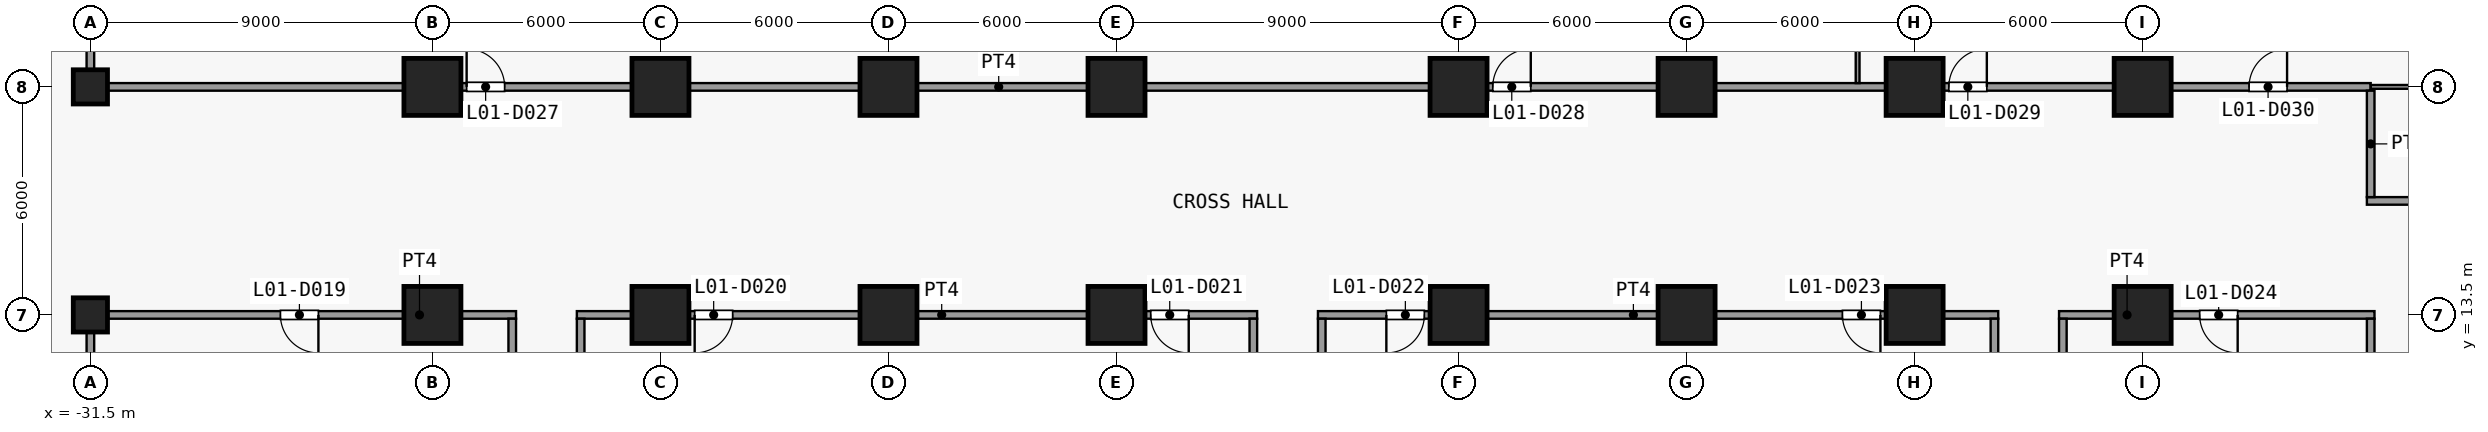
"""IFC4 building model, lengths in metres.
Left out: names, types, materials, properties, quantities, classifications, styles, units other than length and angle.
Written with IfcOpenShell. Run it as: python <this file> out.ifc"""

import sys

from ifc_helpers import new_model, si_unit, direction, frame, frame_2d, origin, origin_2d, place, context, subcontext, project, spatial, rectangle, extrude, element, fill, save


model = new_model("IFC4")
c1 = context("Model", 3, precision=1e-05, world=origin(), true_north=direction((0.0, 1.0)))
c2 = subcontext(c1, "Body", "Model", "MODEL_VIEW")
j1 = project(units=[si_unit("LENGTHUNIT", "METRE"), si_unit("PLANEANGLEUNIT", "RADIAN")], contexts=[c1])
p1 = place(None, origin())
s1 = spatial("IfcSite", under=j1, at=p1, CompositionType="ELEMENT")
p2 = place(p1, origin())
s2 = spatial("IfcBuilding", under=s1, at=p2, CompositionType="ELEMENT")
p3 = place(p2, frame((0.0, 0.0, 8.0)))
s3 = spatial("IfcBuildingStorey", under=s2, at=p3, CompositionType="ELEMENT", Elevation=8.0)
for number, where, z_axis, x_axis in (
    (1, (-31.5, 13.5, 0.0), (0.0, 0.0, 1.0), (1.0, 0.0, 0.0)),
    (2, (-31.5, 19.5, 0.0), (0.0, 0.0, 1.0), (1.0, 0.0, 0.0)),
):
    element("IfcColumn", number, at=place(p3, frame(where, z_axis=z_axis, x_axis=x_axis)), inside=s3, PredefinedType="COLUMN", context=c2, shape_type="SweptSolid", body=[
        extrude(rectangle(XDim=0.9, YDim=0.9, at=origin_2d()), origin(), (0.0, 0.0, 1.0), 5.5),
    ])
for number, where, z_axis, x_axis in (
    (3, (-22.5, 13.5, 0.0), (0.0, 0.0, 1.0), (1.0, 0.0, 0.0)),
    (4, (-22.5, 19.5, 0.0), (0.0, 0.0, 1.0), (1.0, 0.0, 0.0)),
    (5, (-16.5, 13.5, 0.0), (0.0, 0.0, 1.0), (1.0, 0.0, 0.0)),
    (6, (-16.5, 19.5, 0.0), (0.0, 0.0, 1.0), (1.0, 0.0, 0.0)),
    (7, (-10.5, 13.5, 0.0), (0.0, 0.0, 1.0), (1.0, 0.0, 0.0)),
    (8, (-10.5, 19.5, 0.0), (0.0, 0.0, 1.0), (1.0, 0.0, 0.0)),
    (9, (-4.5, 13.5, 0.0), (0.0, 0.0, 1.0), (1.0, 0.0, 0.0)),
    (10, (-4.5, 19.5, 0.0), (0.0, 0.0, 1.0), (1.0, 0.0, 0.0)),
    (11, (4.5, 13.5, 0.0), (0.0, 0.0, 1.0), (1.0, 0.0, 0.0)),
    (12, (4.5, 19.5, 0.0), (0.0, 0.0, 1.0), (1.0, 0.0, 0.0)),
    (13, (10.5, 13.5, 0.0), (0.0, 0.0, 1.0), (1.0, 0.0, 0.0)),
    (14, (10.5, 19.5, 0.0), (0.0, 0.0, 1.0), (1.0, 0.0, 0.0)),
    (15, (16.5, 13.5, 0.0), (0.0, 0.0, 1.0), (1.0, 0.0, 0.0)),
    (16, (16.5, 19.5, 0.0), (0.0, 0.0, 1.0), (1.0, 0.0, 0.0)),
    (17, (22.5, 13.5, 0.0), (0.0, 0.0, 1.0), (1.0, 0.0, 0.0)),
    (18, (22.5, 19.5, 0.0), (0.0, 0.0, 1.0), (1.0, 0.0, 0.0)),
):
    element("IfcColumn", number, at=place(p3, frame(where, z_axis=z_axis, x_axis=x_axis)), inside=s3, PredefinedType="COLUMN", context=c2, shape_type="SweptSolid", body=[
        extrude(rectangle(XDim=1.5, YDim=1.5, at=origin_2d()), origin(), (0.0, 0.0, 1.0), 5.5),
    ])
p4 = place(p3, frame((-31.6, 13.5, 0.0), z_axis=(0.0, 0.0, 1.0), x_axis=(1.0, 0.0, 0.0)))
e19 = element("IfcWall", 19, at=p4, inside=s3, PredefinedType="PARTITIONING", context=c2, shape_type="SweptSolid", body=[
    extrude(rectangle(XDim=11.3, YDim=0.2, at=frame_2d((5.65, 0.0))), origin(), (0.0, 0.0, 1.0), 5.15),
])
p5 = place(p4, frame((5.1, 0.0, 0.0)))
e20 = element("IfcOpeningElement", 20, at=p5, cuts=e19, PredefinedType="OPENING", context=c2, shape_type="SweptSolid", body=[
    extrude(rectangle(XDim=1.0, YDim=2.1, at=frame_2d((0.5, 1.05))), frame((0.0, 0.11, 0.0), z_axis=(0.0, -1.0, 0.0), x_axis=(1.0, 0.0, 0.0)), (0.0, 0.0, 1.0), 0.22),
])
p6 = place(p3, frame((-18.7, 13.5, 0.0), z_axis=(0.0, 0.0, 1.0), x_axis=(1.0, 0.0, 0.0)))
e21 = element("IfcWall", 21, at=p6, inside=s3, PredefinedType="PARTITIONING", context=c2, shape_type="SweptSolid", body=[
    extrude(rectangle(XDim=17.9, YDim=0.2, at=frame_2d((8.95, 0.0))), origin(), (0.0, 0.0, 1.0), 5.15),
])
p7 = place(p6, frame((3.1, 0.0, 0.0)))
e22 = element("IfcOpeningElement", 22, at=p7, cuts=e21, PredefinedType="OPENING", context=c2, shape_type="SweptSolid", body=[
    extrude(rectangle(XDim=1.0, YDim=2.1, at=frame_2d((0.5, 1.05))), frame((0.0, 0.11, 0.0), z_axis=(0.0, -1.0, 0.0), x_axis=(1.0, 0.0, 0.0)), (0.0, 0.0, 1.0), 0.22),
])
p8 = place(p6, frame((15.1, 0.0, 0.0)))
e23 = element("IfcOpeningElement", 23, at=p8, cuts=e21, PredefinedType="OPENING", context=c2, shape_type="SweptSolid", body=[
    extrude(rectangle(XDim=1.0, YDim=2.1, at=frame_2d((0.5, 1.05))), frame((0.0, 0.11, 0.0), z_axis=(0.0, -1.0, 0.0), x_axis=(1.0, 0.0, 0.0)), (0.0, 0.0, 1.0), 0.22),
])
p9 = place(p3, frame((0.8, 13.5, 0.0), z_axis=(0.0, 0.0, 1.0), x_axis=(1.0, 0.0, 0.0)))
e24 = element("IfcWall", 24, at=p9, inside=s3, PredefinedType="PARTITIONING", context=c2, shape_type="SweptSolid", body=[
    extrude(rectangle(XDim=17.9, YDim=0.2, at=frame_2d((8.95, 0.0))), origin(), (0.0, 0.0, 1.0), 5.15),
])
p10 = place(p9, frame((1.8, 0.0, 0.0)))
e25 = element("IfcOpeningElement", 25, at=p10, cuts=e24, PredefinedType="OPENING", context=c2, shape_type="SweptSolid", body=[
    extrude(rectangle(XDim=1.0, YDim=2.1, at=frame_2d((0.5, 1.05))), frame((0.0, 0.11, 0.0), z_axis=(0.0, -1.0, 0.0), x_axis=(1.0, 0.0, 0.0)), (0.0, 0.0, 1.0), 0.22),
])
p11 = place(p9, frame((13.8, 0.0, 0.0)))
e26 = element("IfcOpeningElement", 26, at=p11, cuts=e24, PredefinedType="OPENING", context=c2, shape_type="SweptSolid", body=[
    extrude(rectangle(XDim=1.0, YDim=2.1, at=frame_2d((0.5, 1.05))), frame((0.0, 0.11, 0.0), z_axis=(0.0, -1.0, 0.0), x_axis=(1.0, 0.0, 0.0)), (0.0, 0.0, 1.0), 0.22),
])
p12 = place(p3, frame((20.3, 13.5, 0.0), z_axis=(0.0, 0.0, 1.0), x_axis=(1.0, 0.0, 0.0)))
e27 = element("IfcWall", 27, at=p12, inside=s3, PredefinedType="PARTITIONING", context=c2, shape_type="SweptSolid", body=[
    extrude(rectangle(XDim=8.3, YDim=0.2, at=frame_2d((4.15, 0.0))), origin(), (0.0, 0.0, 1.0), 5.15),
])
p13 = place(p12, frame((3.7, 0.0, 0.0)))
e28 = element("IfcOpeningElement", 28, at=p13, cuts=e27, PredefinedType="OPENING", context=c2, shape_type="SweptSolid", body=[
    extrude(rectangle(XDim=1.0, YDim=2.1, at=frame_2d((0.5, 1.05))), frame((0.0, 0.11, 0.0), z_axis=(0.0, -1.0, 0.0), x_axis=(1.0, 0.0, 0.0)), (0.0, 0.0, 1.0), 0.22),
])
p14 = place(p3, frame((28.4, 16.5, 0.0), z_axis=(0.0, 0.0, 1.0), x_axis=(1.0, 0.0, 0.0)))
e29 = element("IfcWall", 29, at=p14, inside=s3, PredefinedType="PARTITIONING", context=c2, shape_type="SweptSolid", body=[
    extrude(rectangle(XDim=24.2, YDim=0.2, at=frame_2d((12.1, 0.0))), origin(), (0.0, 0.0, 1.0), 5.15),
])
p15 = place(p14, frame((6.2, 0.0, 0.0)))
e30 = element("IfcOpeningElement", 30, at=p15, cuts=e29, PredefinedType="OPENING", context=c2, shape_type="SweptSolid", body=[
    extrude(rectangle(XDim=1.0, YDim=2.1, at=frame_2d((0.5, 1.05))), frame((0.0, 0.11, 0.0), z_axis=(0.0, -1.0, 0.0), x_axis=(1.0, 0.0, 0.0)), (0.0, 0.0, 1.0), 0.22),
])
p16 = place(p14, frame((17.0, 0.0, 0.0)))
e31 = element("IfcOpeningElement", 31, at=p16, cuts=e29, PredefinedType="OPENING", context=c2, shape_type="SweptSolid", body=[
    extrude(rectangle(XDim=1.0, YDim=2.1, at=frame_2d((0.5, 1.05))), frame((0.0, 0.11, 0.0), z_axis=(0.0, -1.0, 0.0), x_axis=(1.0, 0.0, 0.0)), (0.0, 0.0, 1.0), 0.22),
])
p17 = place(p3, frame((-31.6, 19.5, 0.0), z_axis=(0.0, 0.0, 1.0), x_axis=(1.0, 0.0, 0.0)))
e32 = element("IfcWall", 32, at=p17, inside=s3, PredefinedType="PARTITIONING", context=c2, shape_type="SweptSolid", body=[
    extrude(rectangle(XDim=60.1, YDim=0.2, at=frame_2d((30.05, 0.0))), origin(), (0.0, 0.0, 1.0), 5.15),
])
p18 = place(p17, frame((10.0, 0.0, 0.0)))
e33 = element("IfcOpeningElement", 33, at=p18, cuts=e32, PredefinedType="OPENING", context=c2, shape_type="SweptSolid", body=[
    extrude(rectangle(XDim=1.0, YDim=2.1, at=frame_2d((0.5, 1.05))), frame((0.0, 0.11, 0.0), z_axis=(0.0, -1.0, 0.0), x_axis=(1.0, 0.0, 0.0)), (0.0, 0.0, 1.0), 0.22),
])
p19 = place(p17, frame((37.0, 0.0, 0.0)))
e34 = element("IfcOpeningElement", 34, at=p19, cuts=e32, PredefinedType="OPENING", context=c2, shape_type="SweptSolid", body=[
    extrude(rectangle(XDim=1.0, YDim=2.1, at=frame_2d((0.5, 1.05))), frame((0.0, 0.11, 0.0), z_axis=(0.0, -1.0, 0.0), x_axis=(1.0, 0.0, 0.0)), (0.0, 0.0, 1.0), 0.22),
])
p20 = place(p17, frame((49.0, 0.0, 0.0)))
e35 = element("IfcOpeningElement", 35, at=p20, cuts=e32, PredefinedType="OPENING", context=c2, shape_type="SweptSolid", body=[
    extrude(rectangle(XDim=1.0, YDim=2.1, at=frame_2d((0.5, 1.05))), frame((0.0, 0.11, 0.0), z_axis=(0.0, -1.0, 0.0), x_axis=(1.0, 0.0, 0.0)), (0.0, 0.0, 1.0), 0.22),
])
p21 = place(p17, frame((56.9, 0.0, 0.0)))
e36 = element("IfcOpeningElement", 36, at=p21, cuts=e32, PredefinedType="OPENING", context=c2, shape_type="SweptSolid", body=[
    extrude(rectangle(XDim=1.0, YDim=2.1, at=frame_2d((0.5, 1.05))), frame((0.0, 0.11, 0.0), z_axis=(0.0, -1.0, 0.0), x_axis=(1.0, 0.0, 0.0)), (0.0, 0.0, 1.0), 0.22),
])
p22 = place(p3, frame((28.5, 19.5, 0.0), z_axis=(0.0, 0.0, 1.0), x_axis=(1.0, 0.0, 0.0)))
e37 = element("IfcWall", 37, at=p22, inside=s3, PredefinedType="PARTITIONING", context=c2, shape_type="SweptSolid", body=[
    extrude(rectangle(XDim=23.9, YDim=0.1, at=frame_2d((11.95, 0.0))), origin(), (0.0, 0.0, 1.0), 5.15),
])
p23 = place(p3, frame((-31.5, 1.6, 0.0), z_axis=(0.0, 0.0, 1.0), x_axis=(0.0, 1.0, 0.0)))
e38 = element("IfcWall", 38, at=p23, inside=s3, PredefinedType="PARTITIONING", context=c2, shape_type="SweptSolid", body=[
    extrude(rectangle(XDim=11.8, YDim=0.2, at=frame_2d((5.9, 0.0))), origin(), (0.0, 0.0, 1.0), 5.15),
])
p24 = place(p3, frame((-31.5, 19.6, 0.0), z_axis=(0.0, 0.0, 1.0), x_axis=(0.0, 1.0, 0.0)))
e39 = element("IfcWall", 39, at=p24, inside=s3, PredefinedType="PARTITIONING", context=c2, shape_type="SweptSolid", body=[
    extrude(rectangle(XDim=11.8, YDim=0.2, at=frame_2d((5.9, 0.0))), origin(), (0.0, 0.0, 1.0), 5.15),
])
p25 = place(p24, frame((8.3, 0.0, 0.0)))
e40 = element("IfcOpeningElement", 40, at=p25, cuts=e39, PredefinedType="OPENING", context=c2, shape_type="SweptSolid", body=[
    extrude(rectangle(XDim=1.0, YDim=2.1, at=frame_2d((0.5, 1.05))), frame((0.0, 0.11, 0.0), z_axis=(0.0, -1.0, 0.0), x_axis=(1.0, 0.0, 0.0)), (0.0, 0.0, 1.0), 0.22),
])
for number, where, z_axis, x_axis in (
    (41, (-20.4, 1.6, 0.0), (0.0, 0.0, 1.0), (0.0, 1.0, 0.0)),
    (42, (-18.6, 1.6, 0.0), (0.0, 0.0, 1.0), (0.0, 1.0, 0.0)),
    (43, (-0.9, 1.6, 0.0), (0.0, 0.0, 1.0), (0.0, 1.0, 0.0)),
    (44, (0.9, 1.6, 0.0), (0.0, 0.0, 1.0), (0.0, 1.0, 0.0)),
):
    element("IfcWall", number, at=place(p3, frame(where, z_axis=z_axis, x_axis=x_axis)), inside=s3, PredefinedType="PARTITIONING", context=c2, shape_type="SweptSolid", body=[
        extrude(rectangle(XDim=11.8, YDim=0.2, at=frame_2d((5.9, 0.0))), origin(), (0.0, 0.0, 1.0), 5.15),
    ])
p26 = place(p3, frame((15.0, 19.6, 0.0), z_axis=(0.0, 0.0, 1.0), x_axis=(0.0, 1.0, 0.0)))
e45 = element("IfcWall", 45, at=p26, inside=s3, PredefinedType="PARTITIONING", context=c2, shape_type="SweptSolid", body=[
    extrude(rectangle(XDim=5.85, YDim=0.1, at=frame_2d((2.925, 0.0))), origin(), (0.0, 0.0, 1.0), 5.15),
])
for number, where, z_axis, x_axis in (
    (46, (18.6, 1.6, 0.0), (0.0, 0.0, 1.0), (0.0, 1.0, 0.0)),
    (47, (20.4, 1.6, 0.0), (0.0, 0.0, 1.0), (0.0, 1.0, 0.0)),
    (48, (28.5, 1.6, 0.0), (0.0, 0.0, 1.0), (0.0, 1.0, 0.0)),
):
    element("IfcWall", number, at=place(p3, frame(where, z_axis=z_axis, x_axis=x_axis)), inside=s3, PredefinedType="PARTITIONING", context=c2, shape_type="SweptSolid", body=[
        extrude(rectangle(XDim=11.8, YDim=0.2, at=frame_2d((5.9, 0.0))), origin(), (0.0, 0.0, 1.0), 5.15),
    ])
p27 = place(p3, frame((28.5, 16.6, 0.0), z_axis=(0.0, 0.0, 1.0), x_axis=(0.0, 1.0, 0.0)))
e49 = element("IfcWall", 49, at=p27, inside=s3, PredefinedType="PARTITIONING", context=c2, shape_type="SweptSolid", body=[
    extrude(rectangle(XDim=2.8, YDim=0.2, at=frame_2d((1.4, 0.0))), origin(), (0.0, 0.0, 1.0), 5.15),
])
p28 = place(p5, origin())
e50 = element("IfcDoor", 50, at=p28, inside=s3, OperationType="SINGLE_SWING_RIGHT", PredefinedType="DOOR", context=c2, shape_type="SweptSolid", body=[
    extrude(rectangle(XDim=1.0, YDim=2.1, at=frame_2d((0.5, 1.05))), frame((0.0, 0.025, 0.0), z_axis=(0.0, -1.0, 0.0), x_axis=(1.0, 0.0, 0.0)), (0.0, 0.0, 1.0), 0.05),
])
fill(e20, e50)
p29 = place(p7, origin())
e51 = element("IfcDoor", 51, at=p29, inside=s3, OperationType="SINGLE_SWING_LEFT", PredefinedType="DOOR", context=c2, shape_type="SweptSolid", body=[
    extrude(rectangle(XDim=1.0, YDim=2.1, at=frame_2d((0.5, 1.05))), frame((0.0, 0.025, 0.0), z_axis=(0.0, -1.0, 0.0), x_axis=(1.0, 0.0, 0.0)), (0.0, 0.0, 1.0), 0.05),
])
fill(e22, e51)
p30 = place(p8, origin())
e52 = element("IfcDoor", 52, at=p30, inside=s3, OperationType="SINGLE_SWING_RIGHT", PredefinedType="DOOR", context=c2, shape_type="SweptSolid", body=[
    extrude(rectangle(XDim=1.0, YDim=2.1, at=frame_2d((0.5, 1.05))), frame((0.0, 0.025, 0.0), z_axis=(0.0, -1.0, 0.0), x_axis=(1.0, 0.0, 0.0)), (0.0, 0.0, 1.0), 0.05),
])
fill(e23, e52)
p31 = place(p10, origin())
e53 = element("IfcDoor", 53, at=p31, inside=s3, OperationType="SINGLE_SWING_LEFT", PredefinedType="DOOR", context=c2, shape_type="SweptSolid", body=[
    extrude(rectangle(XDim=1.0, YDim=2.1, at=frame_2d((0.5, 1.05))), frame((0.0, 0.025, 0.0), z_axis=(0.0, -1.0, 0.0), x_axis=(1.0, 0.0, 0.0)), (0.0, 0.0, 1.0), 0.05),
])
fill(e25, e53)
p32 = place(p11, origin())
e54 = element("IfcDoor", 54, at=p32, inside=s3, OperationType="SINGLE_SWING_RIGHT", PredefinedType="DOOR", context=c2, shape_type="SweptSolid", body=[
    extrude(rectangle(XDim=1.0, YDim=2.1, at=frame_2d((0.5, 1.05))), frame((0.0, 0.025, 0.0), z_axis=(0.0, -1.0, 0.0), x_axis=(1.0, 0.0, 0.0)), (0.0, 0.0, 1.0), 0.05),
])
fill(e26, e54)
p33 = place(p13, origin())
e55 = element("IfcDoor", 55, at=p33, inside=s3, OperationType="SINGLE_SWING_RIGHT", PredefinedType="DOOR", context=c2, shape_type="SweptSolid", body=[
    extrude(rectangle(XDim=1.0, YDim=2.1, at=frame_2d((0.5, 1.05))), frame((0.0, 0.025, 0.0), z_axis=(0.0, -1.0, 0.0), x_axis=(1.0, 0.0, 0.0)), (0.0, 0.0, 1.0), 0.05),
])
fill(e28, e55)
p34 = place(p18, origin())
e56 = element("IfcDoor", 56, at=p34, inside=s3, OperationType="SINGLE_SWING_RIGHT", PredefinedType="DOOR", context=c2, shape_type="SweptSolid", body=[
    extrude(rectangle(XDim=1.0, YDim=2.1, at=frame_2d((0.5, 1.05))), frame((0.0, 0.025, 0.0), z_axis=(0.0, -1.0, 0.0), x_axis=(1.0, 0.0, 0.0)), (0.0, 0.0, 1.0), 0.05),
])
fill(e33, e56)
p35 = place(p19, origin())
e57 = element("IfcDoor", 57, at=p35, inside=s3, OperationType="SINGLE_SWING_LEFT", PredefinedType="DOOR", context=c2, shape_type="SweptSolid", body=[
    extrude(rectangle(XDim=1.0, YDim=2.1, at=frame_2d((0.5, 1.05))), frame((0.0, 0.025, 0.0), z_axis=(0.0, -1.0, 0.0), x_axis=(1.0, 0.0, 0.0)), (0.0, 0.0, 1.0), 0.05),
])
fill(e34, e57)
p36 = place(p20, origin())
e58 = element("IfcDoor", 58, at=p36, inside=s3, OperationType="SINGLE_SWING_LEFT", PredefinedType="DOOR", context=c2, shape_type="SweptSolid", body=[
    extrude(rectangle(XDim=1.0, YDim=2.1, at=frame_2d((0.5, 1.05))), frame((0.0, 0.025, 0.0), z_axis=(0.0, -1.0, 0.0), x_axis=(1.0, 0.0, 0.0)), (0.0, 0.0, 1.0), 0.05),
])
fill(e35, e58)
p37 = place(p21, origin())
e59 = element("IfcDoor", 59, at=p37, inside=s3, OperationType="SINGLE_SWING_LEFT", PredefinedType="DOOR", context=c2, shape_type="SweptSolid", body=[
    extrude(rectangle(XDim=1.0, YDim=2.1, at=frame_2d((0.5, 1.05))), frame((0.0, 0.025, 0.0), z_axis=(0.0, -1.0, 0.0), x_axis=(1.0, 0.0, 0.0)), (0.0, 0.0, 1.0), 0.05),
])
fill(e36, e59)
save(model, sys.argv[1])
